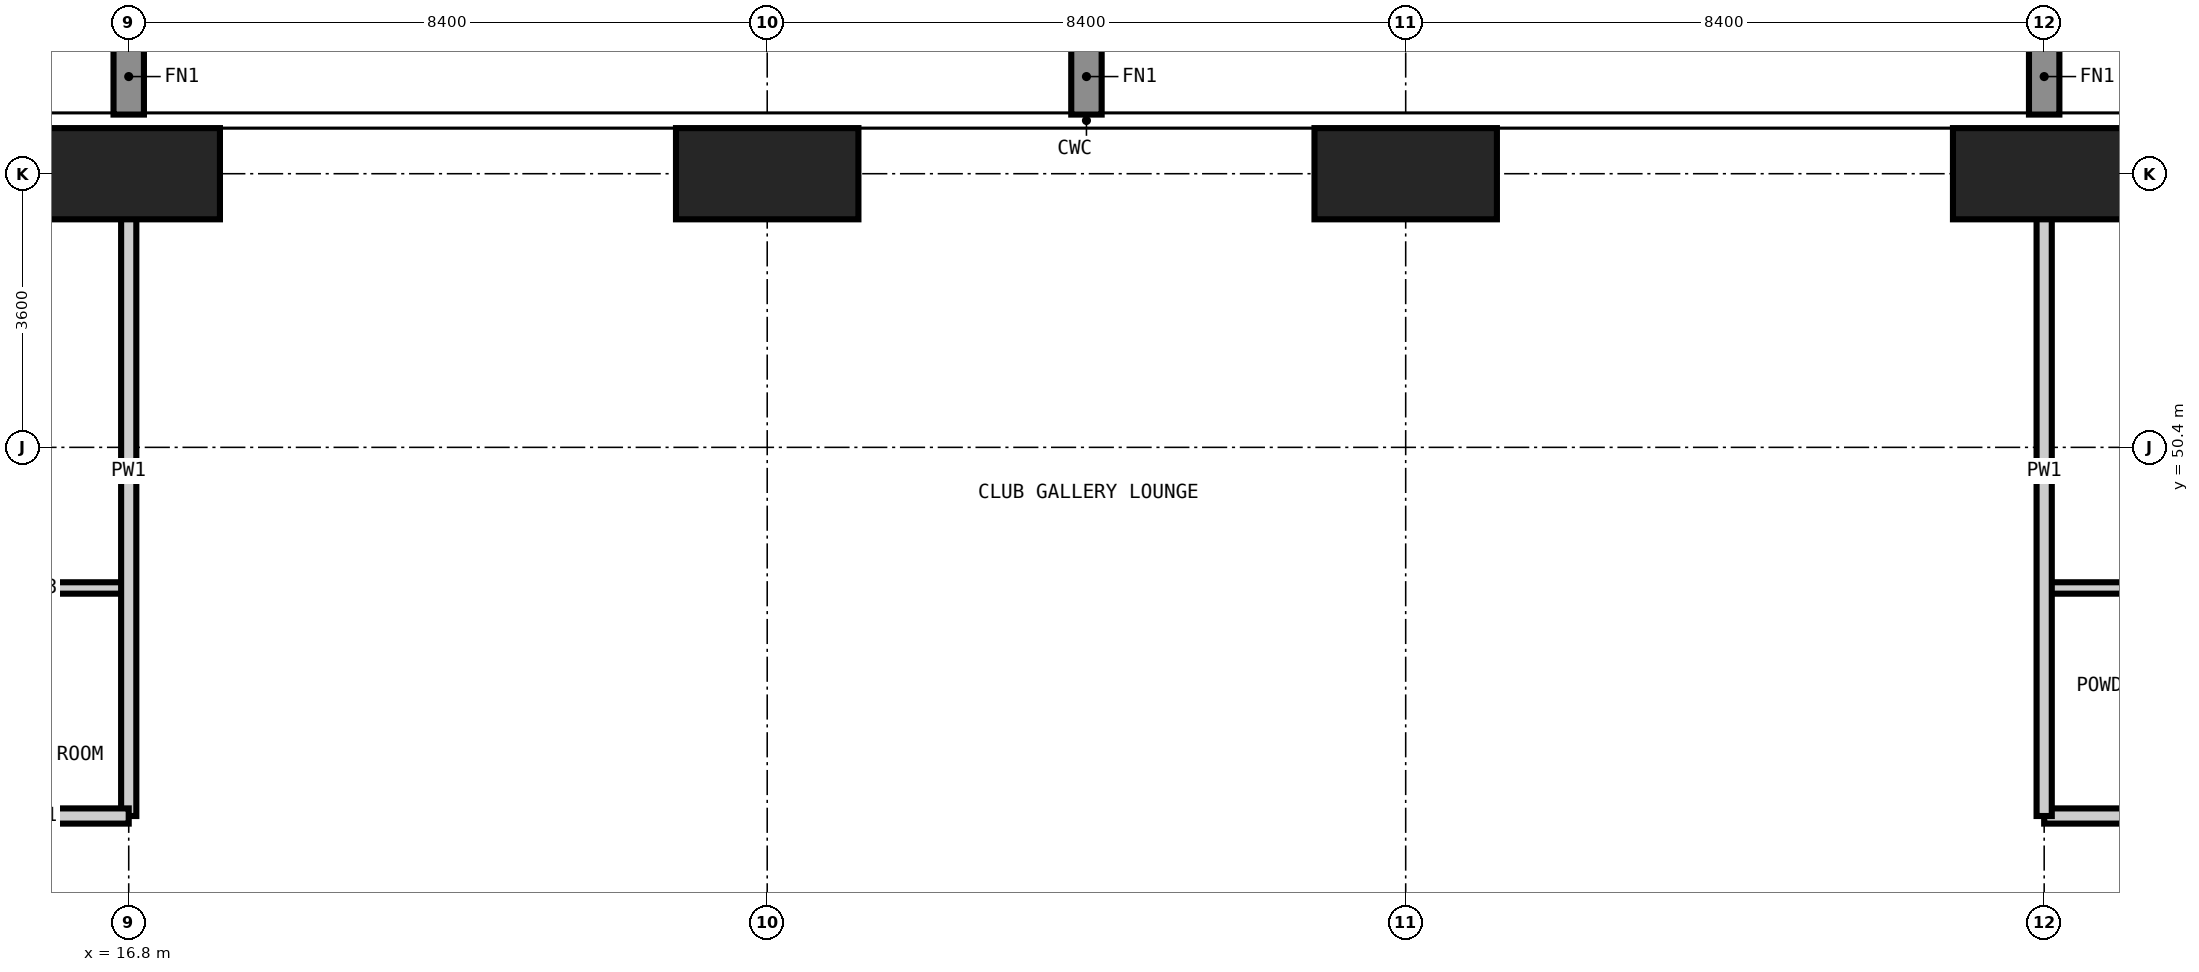
"""IFC4 building model, lengths in metres.
Left out: names, types, materials, properties, quantities, classifications, styles, units other than length and angle.
Written with IfcOpenShell. Run it as: python <this file> out.ifc"""

import sys

from ifc_helpers import new_model, si_unit, direction, frame, frame_2d, origin, origin_2d, place, context, subcontext, project, spatial, rectangle, extrude, element, save


model = new_model("IFC4")
c1 = context("Model", 3, precision=1e-05, world=origin(), true_north=direction((0.0, 1.0)))
c2 = subcontext(c1, "Body", "Model", "MODEL_VIEW")
j1 = project(units=[si_unit("LENGTHUNIT", "METRE"), si_unit("PLANEANGLEUNIT", "RADIAN")], contexts=[c1])
p1 = place(None, origin())
s1 = spatial("IfcSite", under=j1, at=p1, CompositionType="ELEMENT")
p2 = place(p1, origin())
s2 = spatial("IfcBuilding", under=s1, at=p2, CompositionType="ELEMENT")
p3 = place(p2, frame((0.0, 0.0, 177.0)))
s3 = spatial("IfcBuildingStorey", under=s2, at=p3, CompositionType="ELEMENT", Elevation=177.0)
for number, where, z_axis, x_axis in (
    (1, (16.8, 54.0, -0.35), (0.0, 0.0, 1.0), (1.0, 0.0, 0.0)),
    (2, (25.2, 54.0, -0.35), (0.0, 0.0, 1.0), (1.0, 0.0, 0.0)),
    (3, (33.6, 54.0, -0.35), (0.0, 0.0, 1.0), (1.0, 0.0, 0.0)),
    (4, (42.0, 54.0, -0.35), (0.0, 0.0, 1.0), (1.0, 0.0, 0.0)),
):
    element("IfcColumn", number, at=place(p3, frame(where, z_axis=z_axis, x_axis=x_axis)), inside=s3, PredefinedType="COLUMN", context=c2, shape_type="SweptSolid", body=[
        extrude(rectangle(XDim=2.4, YDim=1.2, at=origin_2d()), origin(), (0.0, 0.0, 1.0), 3.6),
    ])
p4 = place(p3, frame((14.45, 48.55, 0.0), z_axis=(0.0, 0.0, 1.0), x_axis=(1.0, 0.0, 0.0)))
e5 = element("IfcWall", 5, at=p4, inside=s3, PredefinedType="PARTITIONING", context=c2, shape_type="SweptSolid", body=[
    extrude(rectangle(XDim=2.35, YDim=0.15, at=frame_2d((1.175, 0.0))), origin(), (0.0, 0.0, 1.0), 3.25),
])
p5 = place(p3, frame((42.0, 48.55, 0.0), z_axis=(0.0, 0.0, 1.0), x_axis=(1.0, 0.0, 0.0)))
e6 = element("IfcWall", 6, at=p5, inside=s3, PredefinedType="PARTITIONING", context=c2, shape_type="SweptSolid", body=[
    extrude(rectangle(XDim=2.95, YDim=0.15, at=frame_2d((1.475, 0.0))), origin(), (0.0, 0.0, 1.0), 3.25),
])
p6 = place(p3, frame((16.8, 45.55, 0.0), z_axis=(0.0, 0.0, 1.0), x_axis=(0.0, 1.0, 0.0)))
e7 = element("IfcWall", 7, at=p6, inside=s3, PredefinedType="PARTITIONING", context=c2, shape_type="SweptSolid", body=[
    extrude(rectangle(XDim=9.068, YDim=0.2, at=frame_2d((4.534, 0.0))), origin(), (0.0, 0.0, 1.0), 3.25),
])
p7 = place(p3, frame((14.45, 45.55, 0.0), z_axis=(0.0, 0.0, 1.0), x_axis=(1.0, 0.0, 0.0)))
e8 = element("IfcWall", 8, at=p7, inside=s3, PredefinedType="PARTITIONING", context=c2, shape_type="SweptSolid", body=[
    extrude(rectangle(XDim=2.35, YDim=0.2, at=frame_2d((1.175, 0.0))), origin(), (0.0, 0.0, 1.0), 3.25),
])
p8 = place(p3, frame((42.0, 45.55, 0.0), z_axis=(0.0, 0.0, 1.0), x_axis=(1.0, 0.0, 0.0)))
e9 = element("IfcWall", 9, at=p8, inside=s3, PredefinedType="PARTITIONING", context=c2, shape_type="SweptSolid", body=[
    extrude(rectangle(XDim=2.95, YDim=0.2, at=frame_2d((1.475, 0.0))), origin(), (0.0, 0.0, 1.0), 3.25),
])
p9 = place(p3, frame((42.0, 54.618, 0.0), z_axis=(0.0, 0.0, 1.0), x_axis=(0.0, -1.0, 0.0)))
e10 = element("IfcWall", 10, at=p9, inside=s3, PredefinedType="PARTITIONING", context=c2, shape_type="SweptSolid", body=[
    extrude(rectangle(XDim=9.068, YDim=0.2, at=frame_2d((4.534, 0.0))), origin(), (0.0, 0.0, 1.0), 3.25),
])
save(model, sys.argv[1])
